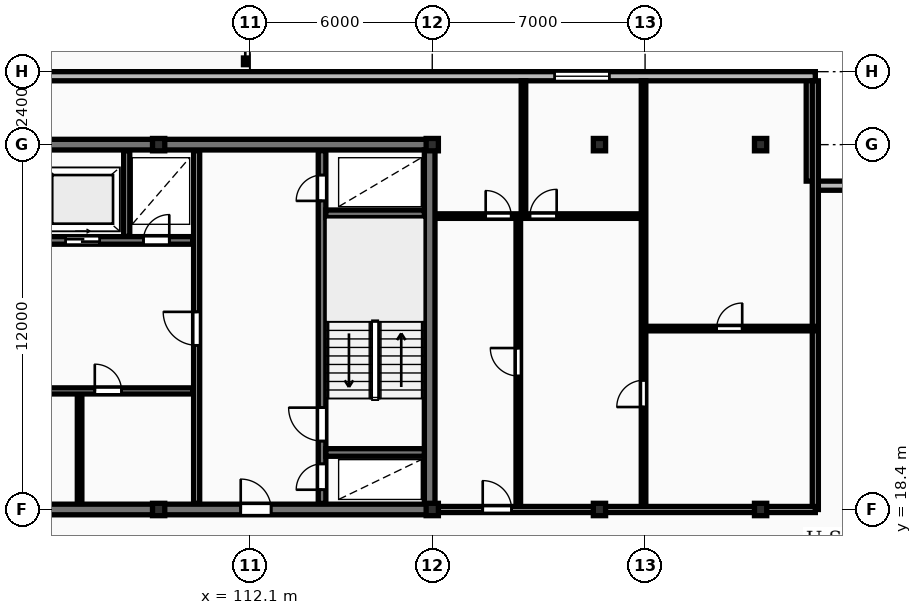
"""IFC4 building model, lengths in metres.
Left out: names, types, materials, properties, quantities, classifications, styles, units other than length and angle.
Written with IfcOpenShell. Run it as: python <this file> out.ifc"""

import sys

from ifc_helpers import new_model, si_unit, direction, frame, frame_2d, origin, origin_2d, place, context, subcontext, project, spatial, rectangle, i_section, extrude, element, fill, save


model = new_model("IFC4")
c1 = context("Model", 3, precision=1e-05, world=origin(), true_north=direction((0.0, 1.0)))
c2 = subcontext(c1, "Body", "Model", "MODEL_VIEW")
j1 = project(units=[si_unit("LENGTHUNIT", "METRE"), si_unit("PLANEANGLEUNIT", "RADIAN")], contexts=[c1])
p1 = place(None, origin())
s1 = spatial("IfcSite", under=j1, at=p1, CompositionType="ELEMENT")
p2 = place(p1, origin())
s2 = spatial("IfcBuilding", under=s1, at=p2, CompositionType="ELEMENT")
p3 = place(p2, frame((0.0, 0.0, 139.3)))
s3 = spatial("IfcBuildingStorey", under=s2, at=p3, CompositionType="ELEMENT", Elevation=139.3)
for number, where, z_axis, x_axis in (
    (1, (109.1, 18.4, 0.0), (0.0, 0.0, 1.0), (1.0, 0.0, 0.0)),
    (2, (109.1, 30.4, 0.0), (0.0, 0.0, 1.0), (1.0, 0.0, 0.0)),
    (3, (118.1, 18.4, 0.0), (0.0, 0.0, 1.0), (1.0, 0.0, 0.0)),
    (4, (118.1, 30.4, 0.0), (0.0, 0.0, 1.0), (1.0, 0.0, 0.0)),
    (5, (123.6, 18.4, 0.0), (0.0, 0.0, 1.0), (1.0, 0.0, 0.0)),
    (6, (123.6, 30.4, 0.0), (0.0, 0.0, 1.0), (1.0, 0.0, 0.0)),
    (7, (128.9, 18.4, 0.0), (0.0, 0.0, 1.0), (1.0, 0.0, 0.0)),
    (8, (128.9, 30.4, 0.0), (0.0, 0.0, 1.0), (1.0, 0.0, 0.0)),
):
    element("IfcColumn", number, at=place(p3, frame(where, z_axis=z_axis, x_axis=x_axis)), inside=s3, PredefinedType="COLUMN", context=c2, shape_type="SweptSolid", body=[
        extrude(i_section(OverallWidth=0.403, OverallDepth=0.406, WebThickness=0.027, FlangeThickness=0.043, FilletRadius=0.015, at=origin_2d()), origin(), (0.0, 0.0, 1.0), 3.6),
    ])
for number, where, z_axis, x_axis in (
    (9, (134.3, 29.05, 0.0), (0.0, 0.0, 1.0), (-1.0, 0.0, 0.0)),
    (10, (130.55, 29.2, 0.0), (0.0, 0.0, 1.0), (0.0, 1.0, 0.0)),
):
    element("IfcWall", number, at=place(p3, frame(where, z_axis=z_axis, x_axis=x_axis)), inside=s3, PredefinedType="STANDARD", context=c2, shape_type="SweptSolid", body=[
        extrude(rectangle(XDim=3.6, YDim=0.3, at=frame_2d((1.8, 0.0))), origin(), (0.0, 0.0, 1.0), 3.31),
    ])
p4 = place(p3, frame((130.7, 32.65, 0.0), z_axis=(0.0, 0.0, 1.0), x_axis=(-1.0, 0.0, 0.0)))
e11 = element("IfcWall", 11, at=p4, inside=s3, PredefinedType="STANDARD", context=c2, shape_type="SweptSolid", body=[
    extrude(rectangle(XDim=58.0, YDim=0.3, at=frame_2d((29.0, 0.0))), origin(), (0.0, 0.0, 1.0), 3.31),
])
p5 = place(p4, frame((50.125, 0.0, 0.85)))
e12 = element("IfcOpeningElement", 12, at=p5, cuts=e11, PredefinedType="OPENING", context=c2, shape_type="SweptSolid", body=[
    extrude(rectangle(XDim=1.8, YDim=1.8, at=frame_2d((0.9, 0.9))), frame((0.0, 0.16, 0.0), z_axis=(0.0, -1.0, 0.0), x_axis=(1.0, 0.0, 0.0)), (0.0, 0.0, 1.0), 0.32),
])
p6 = place(p4, frame((6.775, 0.0, 0.85)))
e13 = element("IfcOpeningElement", 13, at=p6, cuts=e11, PredefinedType="OPENING", context=c2, shape_type="SweptSolid", body=[
    extrude(rectangle(XDim=1.8, YDim=1.8, at=frame_2d((0.9, 0.9))), frame((0.0, 0.16, 0.0), z_axis=(0.0, -1.0, 0.0), x_axis=(1.0, 0.0, 0.0)), (0.0, 0.0, 1.0), 0.32),
])
p7 = place(p4, frame((38.0, 0.0, 0.0)))
e14 = element("IfcOpeningElement", 14, at=p7, cuts=e11, PredefinedType="OPENING", context=c2, shape_type="SweptSolid", body=[
    extrude(rectangle(XDim=1.1, YDim=2.1, at=frame_2d((0.55, 1.05))), frame((0.0, 0.16, 0.0), z_axis=(0.0, -1.0, 0.0), x_axis=(1.0, 0.0, 0.0)), (0.0, 0.0, 1.0), 0.32),
])
p8 = place(p3, frame((81.925, 30.4, 0.0), z_axis=(0.0, 0.0, 1.0), x_axis=(1.0, 0.0, 0.0)))
e15 = element("IfcWall", 15, at=p8, inside=s3, PredefinedType="SHEAR", context=c2, shape_type="SweptSolid", body=[
    extrude(rectangle(XDim=36.265, YDim=0.35, at=frame_2d((18.132, 0.0))), origin(), (0.0, 0.0, 1.0), 3.6),
])
p9 = place(p8, frame((9.675, 0.0, 0.0)))
e16 = element("IfcOpeningElement", 16, at=p9, cuts=e15, PredefinedType="OPENING", context=c2, shape_type="SweptSolid", body=[
    extrude(rectangle(XDim=1.1, YDim=2.1, at=frame_2d((0.55, 1.05))), frame((0.0, 0.185, 0.0), z_axis=(0.0, -1.0, 0.0), x_axis=(1.0, 0.0, 0.0)), (0.0, 0.0, 1.0), 0.37),
])
p10 = place(p3, frame((118.015, 18.575, 0.0), z_axis=(0.0, 0.0, 1.0), x_axis=(0.0, 1.0, 0.0)))
e17 = element("IfcWall", 17, at=p10, inside=s3, PredefinedType="SHEAR", context=c2, shape_type="SweptSolid", body=[
    extrude(rectangle(XDim=11.65, YDim=0.35, at=frame_2d((5.825, 0.0))), origin(), (0.0, 0.0, 1.0), 3.6),
])
p11 = place(p3, frame((81.925, 18.4, 0.0), z_axis=(0.0, 0.0, 1.0), x_axis=(1.0, 0.0, 0.0)))
e18 = element("IfcWall", 18, at=p11, inside=s3, PredefinedType="SHEAR", context=c2, shape_type="SweptSolid", body=[
    extrude(rectangle(XDim=36.265, YDim=0.35, at=frame_2d((18.132, 0.0))), origin(), (0.0, 0.0, 1.0), 3.6),
])
p12 = place(p11, frame((5.675, 0.0, 0.0)))
e19 = element("IfcOpeningElement", 19, at=p12, cuts=e18, PredefinedType="OPENING", context=c2, shape_type="SweptSolid", body=[
    extrude(rectangle(XDim=1.0, YDim=2.15, at=frame_2d((0.5, 1.075))), frame((0.0, 0.185, 0.0), z_axis=(0.0, -1.0, 0.0), x_axis=(1.0, 0.0, 0.0)), (0.0, 0.0, 1.0), 0.37),
])
p13 = place(p11, frame((21.925, 0.0, 0.0)))
e20 = element("IfcOpeningElement", 20, at=p13, cuts=e18, PredefinedType="OPENING", context=c2, shape_type="SweptSolid", body=[
    extrude(rectangle(XDim=1.5, YDim=2.2, at=frame_2d((0.75, 1.1))), frame((0.0, 0.185, 0.0), z_axis=(0.0, -1.0, 0.0), x_axis=(1.0, 0.0, 0.0)), (0.0, 0.0, 1.0), 0.37),
])
p14 = place(p11, frame((29.875, 0.0, 0.0)))
e21 = element("IfcOpeningElement", 21, at=p14, cuts=e18, PredefinedType="OPENING", context=c2, shape_type="SweptSolid", body=[
    extrude(rectangle(XDim=1.0, YDim=2.15, at=frame_2d((0.5, 1.075))), frame((0.0, 0.185, 0.0), z_axis=(0.0, -1.0, 0.0), x_axis=(1.0, 0.0, 0.0)), (0.0, 0.0, 1.0), 0.37),
])
p15 = place(p3, frame((108.05, 27.38, 0.0), z_axis=(0.0, 0.0, 1.0), x_axis=(0.0, 1.0, 0.0)))
e22 = element("IfcWall", 22, at=p15, inside=s3, PredefinedType="PARTITIONING", context=c2, shape_type="SweptSolid", body=[
    extrude(rectangle(XDim=2.82, YDim=0.2, at=frame_2d((1.41, 0.0))), origin(), (0.0, 0.0, 1.0), 3.31),
])
p16 = place(p3, frame((99.68, 27.25, 0.0), z_axis=(0.0, 0.0, 1.0), x_axis=(1.0, 0.0, 0.0)))
e23 = element("IfcWall", 23, at=p16, inside=s3, PredefinedType="SHEAR", context=c2, shape_type="SweptSolid", body=[
    extrude(rectangle(XDim=10.54, YDim=0.25, at=frame_2d((5.27, 0.0))), origin(), (0.0, 0.0, 1.0), 3.6),
])
p17 = place(p16, frame((0.76, 0.0, 0.0)))
e24 = element("IfcOpeningElement", 24, at=p17, cuts=e23, PredefinedType="OPENING", context=c2, shape_type="SweptSolid", body=[
    extrude(rectangle(XDim=1.12, YDim=2.12, at=frame_2d((0.56, 1.06))), frame((0.0, 0.135, 0.0), z_axis=(0.0, -1.0, 0.0), x_axis=(1.0, 0.0, 0.0)), (0.0, 0.0, 1.0), 0.27),
])
p18 = place(p16, frame((3.56, 0.0, 0.0)))
e25 = element("IfcOpeningElement", 25, at=p18, cuts=e23, PredefinedType="OPENING", context=c2, shape_type="SweptSolid", body=[
    extrude(rectangle(XDim=1.12, YDim=2.12, at=frame_2d((0.56, 1.06))), frame((0.0, 0.135, 0.0), z_axis=(0.0, -1.0, 0.0), x_axis=(1.0, 0.0, 0.0)), (0.0, 0.0, 1.0), 0.27),
])
p19 = place(p16, frame((6.36, 0.0, 0.0)))
e26 = element("IfcOpeningElement", 26, at=p19, cuts=e23, PredefinedType="OPENING", context=c2, shape_type="SweptSolid", body=[
    extrude(rectangle(XDim=1.12, YDim=2.12, at=frame_2d((0.56, 1.06))), frame((0.0, 0.135, 0.0), z_axis=(0.0, -1.0, 0.0), x_axis=(1.0, 0.0, 0.0)), (0.0, 0.0, 1.0), 0.27),
])
p20 = place(p16, frame((8.92, 0.0, 0.0)))
e27 = element("IfcOpeningElement", 27, at=p20, cuts=e23, PredefinedType="OPENING", context=c2, shape_type="SweptSolid", body=[
    extrude(rectangle(XDim=0.85, YDim=2.05, at=frame_2d((0.425, 1.025))), frame((0.0, 0.135, 0.0), z_axis=(0.0, -1.0, 0.0), x_axis=(1.0, 0.0, 0.0)), (0.0, 0.0, 1.0), 0.27),
])
p21 = place(p3, frame((106.5, 18.6, 0.0), z_axis=(0.0, 0.0, 1.0), x_axis=(0.0, 1.0, 0.0)))
e28 = element("IfcWall", 28, at=p21, inside=s3, PredefinedType="PARTITIONING", context=c2, shape_type="SweptSolid", body=[
    extrude(rectangle(XDim=3.6, YDim=0.15, at=frame_2d((1.8, 0.0))), origin(), (0.0, 0.0, 1.0), 3.31),
])
p22 = place(p3, frame((91.08, 22.3, 0.0), z_axis=(0.0, 0.0, 1.0), x_axis=(1.0, 0.0, 0.0)))
e29 = element("IfcWall", 29, at=p22, inside=s3, PredefinedType="PARTITIONING", context=c2, shape_type="SweptSolid", body=[
    extrude(rectangle(XDim=19.14, YDim=0.2, at=frame_2d((9.57, 0.0))), origin(), (0.0, 0.0, 1.0), 3.31),
])
p23 = place(p22, frame((1.15, 0.0, 0.0)))
e30 = element("IfcOpeningElement", 30, at=p23, cuts=e29, PredefinedType="OPENING", context=c2, shape_type="SweptSolid", body=[
    extrude(rectangle(XDim=0.85, YDim=2.05, at=frame_2d((0.425, 1.025))), frame((0.0, 0.11, 0.0), z_axis=(0.0, -1.0, 0.0), x_axis=(1.0, 0.0, 0.0)), (0.0, 0.0, 1.0), 0.22),
])
p24 = place(p22, frame((3.2, 0.0, 0.0)))
e31 = element("IfcOpeningElement", 31, at=p24, cuts=e29, PredefinedType="OPENING", context=c2, shape_type="SweptSolid", body=[
    extrude(rectangle(XDim=0.85, YDim=2.05, at=frame_2d((0.425, 1.025))), frame((0.0, 0.11, 0.0), z_axis=(0.0, -1.0, 0.0), x_axis=(1.0, 0.0, 0.0)), (0.0, 0.0, 1.0), 0.22),
])
p25 = place(p22, frame((12.72, 0.0, 0.0)))
e32 = element("IfcOpeningElement", 32, at=p25, cuts=e29, PredefinedType="OPENING", context=c2, shape_type="SweptSolid", body=[
    extrude(rectangle(XDim=1.5, YDim=2.2, at=frame_2d((0.75, 1.1))), frame((0.0, 0.11, 0.0), z_axis=(0.0, -1.0, 0.0), x_axis=(1.0, 0.0, 0.0)), (0.0, 0.0, 1.0), 0.22),
])
p26 = place(p22, frame((6.42, 0.0, 0.0)))
e33 = element("IfcOpeningElement", 33, at=p26, cuts=e29, PredefinedType="OPENING", context=c2, shape_type="SweptSolid", body=[
    extrude(rectangle(XDim=0.92, YDim=2.08, at=frame_2d((0.46, 1.04))), frame((0.0, 0.11, 0.0), z_axis=(0.0, -1.0, 0.0), x_axis=(1.0, 0.0, 0.0)), (0.0, 0.0, 1.0), 0.22),
])
p27 = place(p22, frame((15.92, 0.0, 0.0)))
e34 = element("IfcOpeningElement", 34, at=p27, cuts=e29, PredefinedType="OPENING", context=c2, shape_type="SweptSolid", body=[
    extrude(rectangle(XDim=0.88, YDim=2.06, at=frame_2d((0.44, 1.03))), frame((0.0, 0.11, 0.0), z_axis=(0.0, -1.0, 0.0), x_axis=(1.0, 0.0, 0.0)), (0.0, 0.0, 1.0), 0.22),
])
p28 = place(p3, frame((110.35, 18.6, 0.0), z_axis=(0.0, 0.0, 1.0), x_axis=(0.0, 1.0, 0.0)))
e35 = element("IfcWall", 35, at=p28, inside=s3, PredefinedType="PARTITIONING", context=c2, shape_type="SweptSolid", body=[
    extrude(rectangle(XDim=11.6, YDim=0.2, at=frame_2d((5.8, 0.0))), origin(), (0.0, 0.0, 1.0), 3.31),
])
p29 = place(p28, frame((5.2, 0.0, 0.0)))
e36 = element("IfcOpeningElement", 36, at=p29, cuts=e35, PredefinedType="OPENING", context=c2, shape_type="SweptSolid", body=[
    extrude(rectangle(XDim=1.1, YDim=2.15, at=frame_2d((0.55, 1.075))), frame((0.0, 0.11, 0.0), z_axis=(0.0, -1.0, 0.0), x_axis=(1.0, 0.0, 0.0)), (0.0, 0.0, 1.0), 0.22),
])
p30 = place(p3, frame((114.475, 18.6, 0.0), z_axis=(0.0, 0.0, 1.0), x_axis=(0.0, 1.0, 0.0)))
e37 = element("IfcWall", 37, at=p30, inside=s3, PredefinedType="SHEAR", context=c2, shape_type="SweptSolid", body=[
    extrude(rectangle(XDim=11.6, YDim=0.25, at=frame_2d((5.8, 0.0))), origin(), (0.0, 0.0, 1.0), 3.6),
])
p31 = place(p30, frame((0.45, 0.0, 0.0)))
e38 = element("IfcOpeningElement", 38, at=p31, cuts=e37, PredefinedType="OPENING", context=c2, shape_type="SweptSolid", body=[
    extrude(rectangle(XDim=0.85, YDim=2.05, at=frame_2d((0.425, 1.025))), frame((0.0, 0.135, 0.0), z_axis=(0.0, -1.0, 0.0), x_axis=(1.0, 0.0, 0.0)), (0.0, 0.0, 1.0), 0.27),
])
p32 = place(p30, frame((2.05, 0.0, 0.0)))
e39 = element("IfcOpeningElement", 39, at=p32, cuts=e37, PredefinedType="OPENING", context=c2, shape_type="SweptSolid", body=[
    extrude(rectangle(XDim=1.1, YDim=2.1, at=frame_2d((0.55, 1.05))), frame((0.0, 0.135, 0.0), z_axis=(0.0, -1.0, 0.0), x_axis=(1.0, 0.0, 0.0)), (0.0, 0.0, 1.0), 0.27),
])
p33 = place(p30, frame((9.95, 0.0, 0.0)))
e40 = element("IfcOpeningElement", 40, at=p33, cuts=e37, PredefinedType="OPENING", context=c2, shape_type="SweptSolid", body=[
    extrude(rectangle(XDim=0.85, YDim=2.05, at=frame_2d((0.425, 1.025))), frame((0.0, 0.135, 0.0), z_axis=(0.0, -1.0, 0.0), x_axis=(1.0, 0.0, 0.0)), (0.0, 0.0, 1.0), 0.27),
])
for number, where, z_axis, x_axis in (
    (41, (114.6, 20.275, 0.0), (0.0, 0.0, 1.0), (1.0, 0.0, 0.0)),
    (42, (114.6, 28.125, 0.0), (0.0, 0.0, 1.0), (1.0, 0.0, 0.0)),
):
    element("IfcWall", number, at=place(p3, frame(where, z_axis=z_axis, x_axis=x_axis)), inside=s3, PredefinedType="SHEAR", context=c2, shape_type="SweptSolid", body=[
        extrude(rectangle(XDim=3.24, YDim=0.25, at=frame_2d((1.62, 0.0))), origin(), (0.0, 0.0, 1.0), 3.6),
    ])
p34 = place(p3, frame((130.7, 18.4, 0.0), z_axis=(0.0, 0.0, 1.0), x_axis=(0.0, 1.0, 0.0)))
e43 = element("IfcWall", 43, at=p34, inside=s3, PredefinedType="PARTITIONING", context=c2, shape_type="SweptSolid", body=[
    extrude(rectangle(XDim=14.1, YDim=0.2, at=frame_2d((7.05, 0.0))), origin(), (0.0, 0.0, 1.0), 3.31),
])
p35 = place(p3, frame((125.05, 24.35, 0.0), z_axis=(0.0, 0.0, 1.0), x_axis=(1.0, 0.0, 0.0)))
e44 = element("IfcWall", 44, at=p35, inside=s3, PredefinedType="PARTITIONING", context=c2, shape_type="SweptSolid", body=[
    extrude(rectangle(XDim=5.65, YDim=0.15, at=frame_2d((2.825, 0.0))), origin(), (0.0, 0.0, 1.0), 3.31),
])
p36 = place(p35, frame((2.405, 0.0, 0.0)))
e45 = element("IfcOpeningElement", 45, at=p36, cuts=e44, PredefinedType="OPENING", context=c2, shape_type="SweptSolid", body=[
    extrude(rectangle(XDim=0.84, YDim=2.04, at=frame_2d((0.42, 1.02))), frame((0.0, 0.085, 0.0), z_axis=(0.0, -1.0, 0.0), x_axis=(1.0, 0.0, 0.0)), (0.0, 0.0, 1.0), 0.17),
])
p37 = place(p3, frame((125.05, 18.45, 0.0), z_axis=(0.0, 0.0, 1.0), x_axis=(0.0, 1.0, 0.0)))
e46 = element("IfcWall", 46, at=p37, inside=s3, PredefinedType="PARTITIONING", context=c2, shape_type="SweptSolid", body=[
    extrude(rectangle(XDim=14.05, YDim=0.15, at=frame_2d((7.025, 0.0))), origin(), (0.0, 0.0, 1.0), 3.31),
])
p38 = place(p37, frame((3.32, 0.0, 0.0)))
e47 = element("IfcOpeningElement", 47, at=p38, cuts=e46, PredefinedType="OPENING", context=c2, shape_type="SweptSolid", body=[
    extrude(rectangle(XDim=0.88, YDim=2.06, at=frame_2d((0.44, 1.03))), frame((0.0, 0.085, 0.0), z_axis=(0.0, -1.0, 0.0), x_axis=(1.0, 0.0, 0.0)), (0.0, 0.0, 1.0), 0.17),
])
p39 = place(p3, frame((120.93, 18.45, 0.0), z_axis=(0.0, 0.0, 1.0), x_axis=(0.0, 1.0, 0.0)))
e48 = element("IfcWall", 48, at=p39, inside=s3, PredefinedType="PARTITIONING", context=c2, shape_type="SweptSolid", body=[
    extrude(rectangle(XDim=9.6, YDim=0.15, at=frame_2d((4.8, 0.0))), origin(), (0.0, 0.0, 1.0), 3.31),
])
p40 = place(p39, frame((4.34, 0.0, 0.0)))
e49 = element("IfcOpeningElement", 49, at=p40, cuts=e48, PredefinedType="OPENING", context=c2, shape_type="SweptSolid", body=[
    extrude(rectangle(XDim=0.92, YDim=2.08, at=frame_2d((0.46, 1.04))), frame((0.0, 0.085, 0.0), z_axis=(0.0, -1.0, 0.0), x_axis=(1.0, 0.0, 0.0)), (0.0, 0.0, 1.0), 0.17),
])
p41 = place(p3, frame((121.1, 28.05, 0.0), z_axis=(0.0, 0.0, 1.0), x_axis=(0.0, 1.0, 0.0)))
e50 = element("IfcWall", 50, at=p41, inside=s3, PredefinedType="PARTITIONING", context=c2, shape_type="SweptSolid", body=[
    extrude(rectangle(XDim=4.45, YDim=0.15, at=frame_2d((2.225, 0.0))), origin(), (0.0, 0.0, 1.0), 3.31),
])
p42 = place(p3, frame((118.27, 28.05, 0.0), z_axis=(0.0, 0.0, 1.0), x_axis=(1.0, 0.0, 0.0)))
e51 = element("IfcWall", 51, at=p42, inside=s3, PredefinedType="PARTITIONING", context=c2, shape_type="SweptSolid", body=[
    extrude(rectangle(XDim=6.76, YDim=0.15, at=frame_2d((3.38, 0.0))), origin(), (0.0, 0.0, 1.0), 3.31),
])
p43 = place(p42, frame((1.587, 0.0, 0.0)))
e52 = element("IfcOpeningElement", 52, at=p43, cuts=e51, PredefinedType="OPENING", context=c2, shape_type="SweptSolid", body=[
    extrude(rectangle(XDim=0.84, YDim=2.04, at=frame_2d((0.42, 1.02))), frame((0.0, 0.085, 0.0), z_axis=(0.0, -1.0, 0.0), x_axis=(1.0, 0.0, 0.0)), (0.0, 0.0, 1.0), 0.17),
])
p44 = place(p42, frame((3.042, 0.0, 0.0)))
e53 = element("IfcOpeningElement", 53, at=p44, cuts=e51, PredefinedType="OPENING", context=c2, shape_type="SweptSolid", body=[
    extrude(rectangle(XDim=0.88, YDim=2.06, at=frame_2d((0.44, 1.03))), frame((0.0, 0.085, 0.0), z_axis=(0.0, -1.0, 0.0), x_axis=(1.0, 0.0, 0.0)), (0.0, 0.0, 1.0), 0.17),
])
p45 = place(p3, frame((118.25, 18.4, 0.0), z_axis=(0.0, 0.0, 1.0), x_axis=(1.0, 0.0, 0.0)))
e54 = element("IfcWall", 54, at=p45, inside=s3, PredefinedType="PARTITIONING", context=c2, shape_type="SweptSolid", body=[
    extrude(rectangle(XDim=12.45, YDim=0.2, at=frame_2d((6.225, 0.0))), origin(), (0.0, 0.0, 1.0), 2.698),
])
p46 = place(p45, frame((1.51, 0.0, 0.0)))
e55 = element("IfcOpeningElement", 55, at=p46, cuts=e54, PredefinedType="OPENING", context=c2, shape_type="SweptSolid", body=[
    extrude(rectangle(XDim=0.95, YDim=2.15, at=frame_2d((0.475, 1.075))), frame((0.0, 0.11, 0.0), z_axis=(0.0, -1.0, 0.0), x_axis=(1.0, 0.0, 0.0)), (0.0, 0.0, 1.0), 0.22),
])
p47 = place(p6, origin())
e56 = element("IfcWindow", 56, at=p47, inside=s3, PartitioningType="SINGLE_PANEL", PredefinedType="WINDOW", context=c2, shape_type="SweptSolid", body=[
    extrude(rectangle(XDim=1.8, YDim=1.8, at=frame_2d((0.9, 0.9))), frame((0.0, 0.03, 0.0), z_axis=(0.0, -1.0, 0.0), x_axis=(1.0, 0.0, 0.0)), (0.0, 0.0, 1.0), 0.06),
])
fill(e13, e56)
p48 = place(p14, origin())
e57 = element("IfcDoor", 57, at=p48, inside=s3, OperationType="SINGLE_SWING_LEFT", PredefinedType="DOOR", context=c2, shape_type="SweptSolid", body=[
    extrude(rectangle(XDim=1.0, YDim=2.15, at=frame_2d((0.5, 1.075))), frame((0.0, 0.025, 0.0), z_axis=(0.0, -1.0, 0.0), x_axis=(1.0, 0.0, 0.0)), (0.0, 0.0, 1.0), 0.05),
])
fill(e21, e57)
p49 = place(p19, origin())
e58 = element("IfcDoor", 58, at=p49, inside=s3, OperationType="SLIDING_TO_RIGHT", PredefinedType="DOOR", context=c2, shape_type="SweptSolid", body=[
    extrude(rectangle(XDim=1.12, YDim=2.12, at=frame_2d((0.56, 1.06))), frame((0.0, 0.025, 0.0), z_axis=(0.0, -1.0, 0.0), x_axis=(1.0, 0.0, 0.0)), (0.0, 0.0, 1.0), 0.05),
])
fill(e26, e58)
p50 = place(p20, origin())
e59 = element("IfcDoor", 59, at=p50, inside=s3, OperationType="SINGLE_SWING_RIGHT", PredefinedType="DOOR", context=c2, shape_type="SweptSolid", body=[
    extrude(rectangle(XDim=0.85, YDim=2.05, at=frame_2d((0.425, 1.025))), frame((0.0, 0.025, 0.0), z_axis=(0.0, -1.0, 0.0), x_axis=(1.0, 0.0, 0.0)), (0.0, 0.0, 1.0), 0.05),
])
fill(e27, e59)
p51 = place(p27, origin())
e60 = element("IfcDoor", 60, at=p51, inside=s3, OperationType="SINGLE_SWING_LEFT", PredefinedType="DOOR", context=c2, shape_type="SweptSolid", body=[
    extrude(rectangle(XDim=0.88, YDim=2.06, at=frame_2d((0.44, 1.03))), frame((0.0, 0.025, 0.0), z_axis=(0.0, -1.0, 0.0), x_axis=(1.0, 0.0, 0.0)), (0.0, 0.0, 1.0), 0.05),
])
fill(e34, e60)
p52 = place(p29, origin())
e61 = element("IfcDoor", 61, at=p52, inside=s3, OperationType="SINGLE_SWING_RIGHT", PredefinedType="DOOR", context=c2, shape_type="SweptSolid", body=[
    extrude(rectangle(XDim=1.1, YDim=2.15, at=frame_2d((0.55, 1.075))), frame((0.0, 0.025, 0.0), z_axis=(0.0, -1.0, 0.0), x_axis=(1.0, 0.0, 0.0)), (0.0, 0.0, 1.0), 0.05),
])
fill(e36, e61)
p53 = place(p31, origin())
e62 = element("IfcDoor", 62, at=p53, inside=s3, OperationType="SINGLE_SWING_LEFT", PredefinedType="DOOR", context=c2, shape_type="SweptSolid", body=[
    extrude(rectangle(XDim=0.85, YDim=2.05, at=frame_2d((0.425, 1.025))), frame((0.0, 0.025, 0.0), z_axis=(0.0, -1.0, 0.0), x_axis=(1.0, 0.0, 0.0)), (0.0, 0.0, 1.0), 0.05),
])
fill(e38, e62)
p54 = place(p32, origin())
e63 = element("IfcDoor", 63, at=p54, inside=s3, OperationType="SINGLE_SWING_RIGHT", PredefinedType="DOOR", context=c2, shape_type="SweptSolid", body=[
    extrude(rectangle(XDim=1.1, YDim=2.1, at=frame_2d((0.55, 1.05))), frame((0.0, 0.025, 0.0), z_axis=(0.0, -1.0, 0.0), x_axis=(1.0, 0.0, 0.0)), (0.0, 0.0, 1.0), 0.05),
])
fill(e39, e63)
p55 = place(p33, origin())
e64 = element("IfcDoor", 64, at=p55, inside=s3, OperationType="SINGLE_SWING_LEFT", PredefinedType="DOOR", context=c2, shape_type="SweptSolid", body=[
    extrude(rectangle(XDim=0.85, YDim=2.05, at=frame_2d((0.425, 1.025))), frame((0.0, 0.025, 0.0), z_axis=(0.0, -1.0, 0.0), x_axis=(1.0, 0.0, 0.0)), (0.0, 0.0, 1.0), 0.05),
])
fill(e40, e64)
p56 = place(p36, origin())
e65 = element("IfcDoor", 65, at=p56, inside=s3, OperationType="SINGLE_SWING_RIGHT", PredefinedType="DOOR", context=c2, shape_type="SweptSolid", body=[
    extrude(rectangle(XDim=0.84, YDim=2.04, at=frame_2d((0.42, 1.02))), frame((0.0, 0.025, 0.0), z_axis=(0.0, -1.0, 0.0), x_axis=(1.0, 0.0, 0.0)), (0.0, 0.0, 1.0), 0.05),
])
fill(e45, e65)
p57 = place(p38, origin())
e66 = element("IfcDoor", 66, at=p57, inside=s3, OperationType="SINGLE_SWING_LEFT", PredefinedType="DOOR", context=c2, shape_type="SweptSolid", body=[
    extrude(rectangle(XDim=0.88, YDim=2.06, at=frame_2d((0.44, 1.03))), frame((0.0, 0.025, 0.0), z_axis=(0.0, -1.0, 0.0), x_axis=(1.0, 0.0, 0.0)), (0.0, 0.0, 1.0), 0.05),
])
fill(e47, e66)
p58 = place(p40, origin())
e67 = element("IfcDoor", 67, at=p58, inside=s3, OperationType="SINGLE_SWING_RIGHT", PredefinedType="DOOR", context=c2, shape_type="SweptSolid", body=[
    extrude(rectangle(XDim=0.92, YDim=2.08, at=frame_2d((0.46, 1.04))), frame((0.0, 0.025, 0.0), z_axis=(0.0, -1.0, 0.0), x_axis=(1.0, 0.0, 0.0)), (0.0, 0.0, 1.0), 0.05),
])
fill(e49, e67)
p59 = place(p43, origin())
e68 = element("IfcDoor", 68, at=p59, inside=s3, OperationType="SINGLE_SWING_LEFT", PredefinedType="DOOR", context=c2, shape_type="SweptSolid", body=[
    extrude(rectangle(XDim=0.84, YDim=2.04, at=frame_2d((0.42, 1.02))), frame((0.0, 0.025, 0.0), z_axis=(0.0, -1.0, 0.0), x_axis=(1.0, 0.0, 0.0)), (0.0, 0.0, 1.0), 0.05),
])
fill(e52, e68)
p60 = place(p44, origin())
e69 = element("IfcDoor", 69, at=p60, inside=s3, OperationType="SINGLE_SWING_RIGHT", PredefinedType="DOOR", context=c2, shape_type="SweptSolid", body=[
    extrude(rectangle(XDim=0.88, YDim=2.06, at=frame_2d((0.44, 1.03))), frame((0.0, 0.025, 0.0), z_axis=(0.0, -1.0, 0.0), x_axis=(1.0, 0.0, 0.0)), (0.0, 0.0, 1.0), 0.05),
])
fill(e53, e69)
p61 = place(p46, origin())
e70 = element("IfcDoor", 70, at=p61, inside=s3, OperationType="SINGLE_SWING_LEFT", PredefinedType="DOOR", context=c2, shape_type="SweptSolid", body=[
    extrude(rectangle(XDim=0.95, YDim=2.15, at=frame_2d((0.475, 1.075))), frame((0.0, 0.025, 0.0), z_axis=(0.0, -1.0, 0.0), x_axis=(1.0, 0.0, 0.0)), (0.0, 0.0, 1.0), 0.05),
])
fill(e55, e70)
save(model, sys.argv[1])
